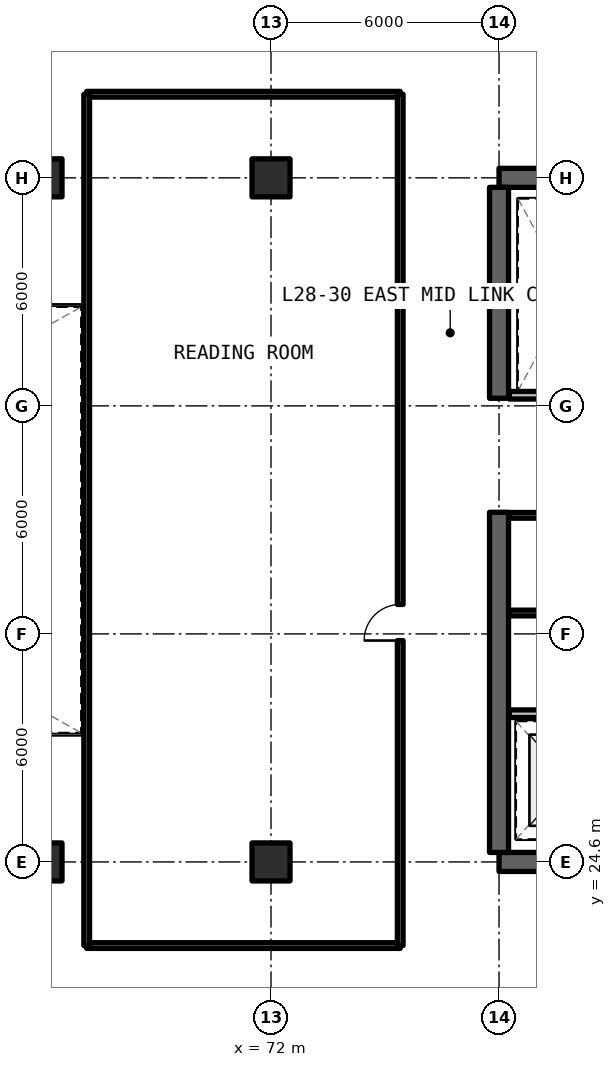
"""IFC4 building model, lengths in metres.
Left out: names, types, materials, properties, quantities, classifications, styles, units other than length and angle.
Written with IfcOpenShell. Run it as: python <this file> out.ifc"""

import sys

from ifc_helpers import new_model, si_unit, direction, frame, frame_2d, origin, origin_2d, place, context, subcontext, project, spatial, rectangle, extrude, element, fill, save


model = new_model("IFC4")
c1 = context("Model", 3, precision=1e-05, world=origin(), true_north=direction((0.0, 1.0)))
c2 = subcontext(c1, "Body", "Model", "MODEL_VIEW")
j1 = project(units=[si_unit("LENGTHUNIT", "METRE"), si_unit("PLANEANGLEUNIT", "RADIAN")], contexts=[c1])
p1 = place(None, origin())
s1 = spatial("IfcSite", under=j1, at=p1, CompositionType="ELEMENT")
p2 = place(p1, origin())
s2 = spatial("IfcBuilding", under=s1, at=p2, CompositionType="ELEMENT")
p3 = place(p2, frame((0.0, 0.0, 101.97)))
s3 = spatial("IfcBuildingStorey", under=s2, at=p3, CompositionType="ELEMENT", Elevation=101.97)
for number, where, z_axis, x_axis in (
    (1, (78.0, 24.6, 0.0), (0.0, 0.0, 1.0), (1.0, 0.0, 0.0)),
    (2, (90.0, 42.6, 0.0), (0.0, 0.0, 1.0), (-1.0, 0.0, 0.0)),
):
    element("IfcWall", number, at=place(p3, frame(where, z_axis=z_axis, x_axis=x_axis)), inside=s3, PredefinedType="SHEAR", context=c2, shape_type="SweptSolid", body=[
        extrude(rectangle(XDim=12.0, YDim=0.5, at=frame_2d((6.0, 0.0))), origin(), (0.0, 0.0, 1.0), 3.3),
    ])
p4 = place(p3, frame((78.0, 24.85, 0.0), z_axis=(0.0, 0.0, 1.0), x_axis=(0.0, 1.0, 0.0)))
e3 = element("IfcWall", 3, at=p4, inside=s3, PredefinedType="SHEAR", context=c2, shape_type="SweptSolid", body=[
    extrude(rectangle(XDim=8.95, YDim=0.5, at=frame_2d((4.475, 0.0))), origin(), (0.0, 0.0, 1.0), 3.3),
])
p5 = place(p3, frame((78.0, 36.8, 0.0), z_axis=(0.0, 0.0, 1.0), x_axis=(0.0, 1.0, 0.0)))
e4 = element("IfcWall", 4, at=p5, inside=s3, PredefinedType="SHEAR", context=c2, shape_type="SweptSolid", body=[
    extrude(rectangle(XDim=5.55, YDim=0.5, at=frame_2d((2.775, 0.0))), origin(), (0.0, 0.0, 1.0), 3.3),
])
for number, where, z_axis, x_axis in (
    (5, (66.0, 24.6, 0.0), (0.0, 0.0, 1.0), (1.0, 0.0, 0.0)),
    (6, (66.0, 42.6, 0.0), (0.0, 0.0, 1.0), (1.0, 0.0, 0.0)),
    (7, (72.0, 24.6, 0.0), (0.0, 0.0, 1.0), (1.0, 0.0, 0.0)),
    (8, (72.0, 42.6, 0.0), (0.0, 0.0, 1.0), (1.0, 0.0, 0.0)),
):
    element("IfcColumn", number, at=place(p3, frame(where, z_axis=z_axis, x_axis=x_axis)), inside=s3, PredefinedType="COLUMN", context=c2, shape_type="SweptSolid", body=[
        extrude(rectangle(XDim=1.0, YDim=1.0, at=origin_2d()), origin(), (0.0, 0.0, 1.0), 3.3),
    ])
p6 = place(p3, frame((78.27, 28.5, 0.0), z_axis=(0.0, 0.0, 1.0), x_axis=(1.0, 0.0, 0.0)))
e9 = element("IfcWall", 9, at=p6, inside=s3, PredefinedType="SOLIDWALL", context=c2, shape_type="SweptSolid", body=[
    extrude(rectangle(XDim=7.51, YDim=0.2, at=frame_2d((3.755, 0.0))), origin(), (0.0, 0.0, 1.0), 2.35),
])
p7 = place(p6, frame((3.53, 0.0, 0.0)))
e10 = element("IfcOpeningElement", 10, at=p7, cuts=e9, PredefinedType="OPENING", context=c2, shape_type="SweptSolid", body=[
    extrude(rectangle(XDim=1.0, YDim=2.15, at=frame_2d((0.5, 1.075))), frame((0.0, 0.11, 0.0), z_axis=(0.0, -1.0, 0.0), x_axis=(1.0, 0.0, 0.0)), (0.0, 0.0, 1.0), 0.22),
])
for number, where, z_axis, x_axis in (
    (11, (78.27, 31.15, 0.0), (0.0, 0.0, 1.0), (1.0, 0.0, 0.0)),
    (12, (78.27, 33.72, 0.0), (0.0, 0.0, 1.0), (1.0, 0.0, 0.0)),
):
    element("IfcWall", number, at=place(p3, frame(where, z_axis=z_axis, x_axis=x_axis)), inside=s3, PredefinedType="SOLIDWALL", context=c2, shape_type="SweptSolid", body=[
        extrude(rectangle(XDim=3.05, YDim=0.15, at=frame_2d((1.525, 0.0))), origin(), (0.0, 0.0, 1.0), 2.35),
    ])
p8 = place(p3, frame((78.27, 36.88, 0.0), z_axis=(0.0, 0.0, 1.0), x_axis=(1.0, 0.0, 0.0)))
e13 = element("IfcWall", 13, at=p8, inside=s3, PredefinedType="SOLIDWALL", context=c2, shape_type="SweptSolid", body=[
    extrude(rectangle(XDim=3.05, YDim=0.2, at=frame_2d((1.525, 0.0))), origin(), (0.0, 0.0, 1.0), 2.35),
])
for number, where, z_axis, x_axis in (
    (14, (67.15, 22.4, 0.0), (0.0, 0.0, 1.0), (1.0, 0.0, 0.0)),
    (15, (67.15, 44.8, 0.0), (0.0, 0.0, 1.0), (1.0, 0.0, 0.0)),
):
    element("IfcWall", number, at=place(p3, frame(where, z_axis=z_axis, x_axis=x_axis)), inside=s3, PredefinedType="SOLIDWALL", context=c2, shape_type="SweptSolid", body=[
        extrude(rectangle(XDim=8.25, YDim=0.15, at=frame_2d((4.125, 0.0))), origin(), (0.0, 0.0, 1.0), 2.35),
    ])
p9 = place(p3, frame((67.15, 22.4, 0.0), z_axis=(0.0, 0.0, 1.0), x_axis=(0.0, 1.0, 0.0)))
e16 = element("IfcWall", 16, at=p9, inside=s3, PredefinedType="SOLIDWALL", context=c2, shape_type="SweptSolid", body=[
    extrude(rectangle(XDim=22.4, YDim=0.15, at=frame_2d((11.2, 0.0))), origin(), (0.0, 0.0, 1.0), 2.35),
])
p10 = place(p3, frame((75.4, 22.4, 0.0), z_axis=(0.0, 0.0, 1.0), x_axis=(0.0, 1.0, 0.0)))
e17 = element("IfcWall", 17, at=p10, inside=s3, PredefinedType="SOLIDWALL", context=c2, shape_type="SweptSolid", body=[
    extrude(rectangle(XDim=22.4, YDim=0.15, at=frame_2d((11.2, 0.0))), origin(), (0.0, 0.0, 1.0), 2.35),
])
p11 = place(p10, frame((8.025, 0.0, 0.0)))
e18 = element("IfcOpeningElement", 18, at=p11, cuts=e17, PredefinedType="OPENING", context=c2, shape_type="SweptSolid", body=[
    extrude(rectangle(XDim=0.95, YDim=2.15, at=frame_2d((0.475, 1.075))), frame((0.0, 0.085, 0.0), z_axis=(0.0, -1.0, 0.0), x_axis=(1.0, 0.0, 0.0)), (0.0, 0.0, 1.0), 0.17),
])
p12 = place(p11, origin())
e19 = element("IfcDoor", 19, at=p12, inside=s3, OperationType="SINGLE_SWING_LEFT", PredefinedType="DOOR", context=c2, shape_type="SweptSolid", body=[
    extrude(rectangle(XDim=0.95, YDim=2.15, at=frame_2d((0.475, 1.075))), frame((0.0, 0.025, 0.0), z_axis=(0.0, -1.0, 0.0), x_axis=(1.0, 0.0, 0.0)), (0.0, 0.0, 1.0), 0.05),
])
fill(e18, e19)
save(model, sys.argv[1])
